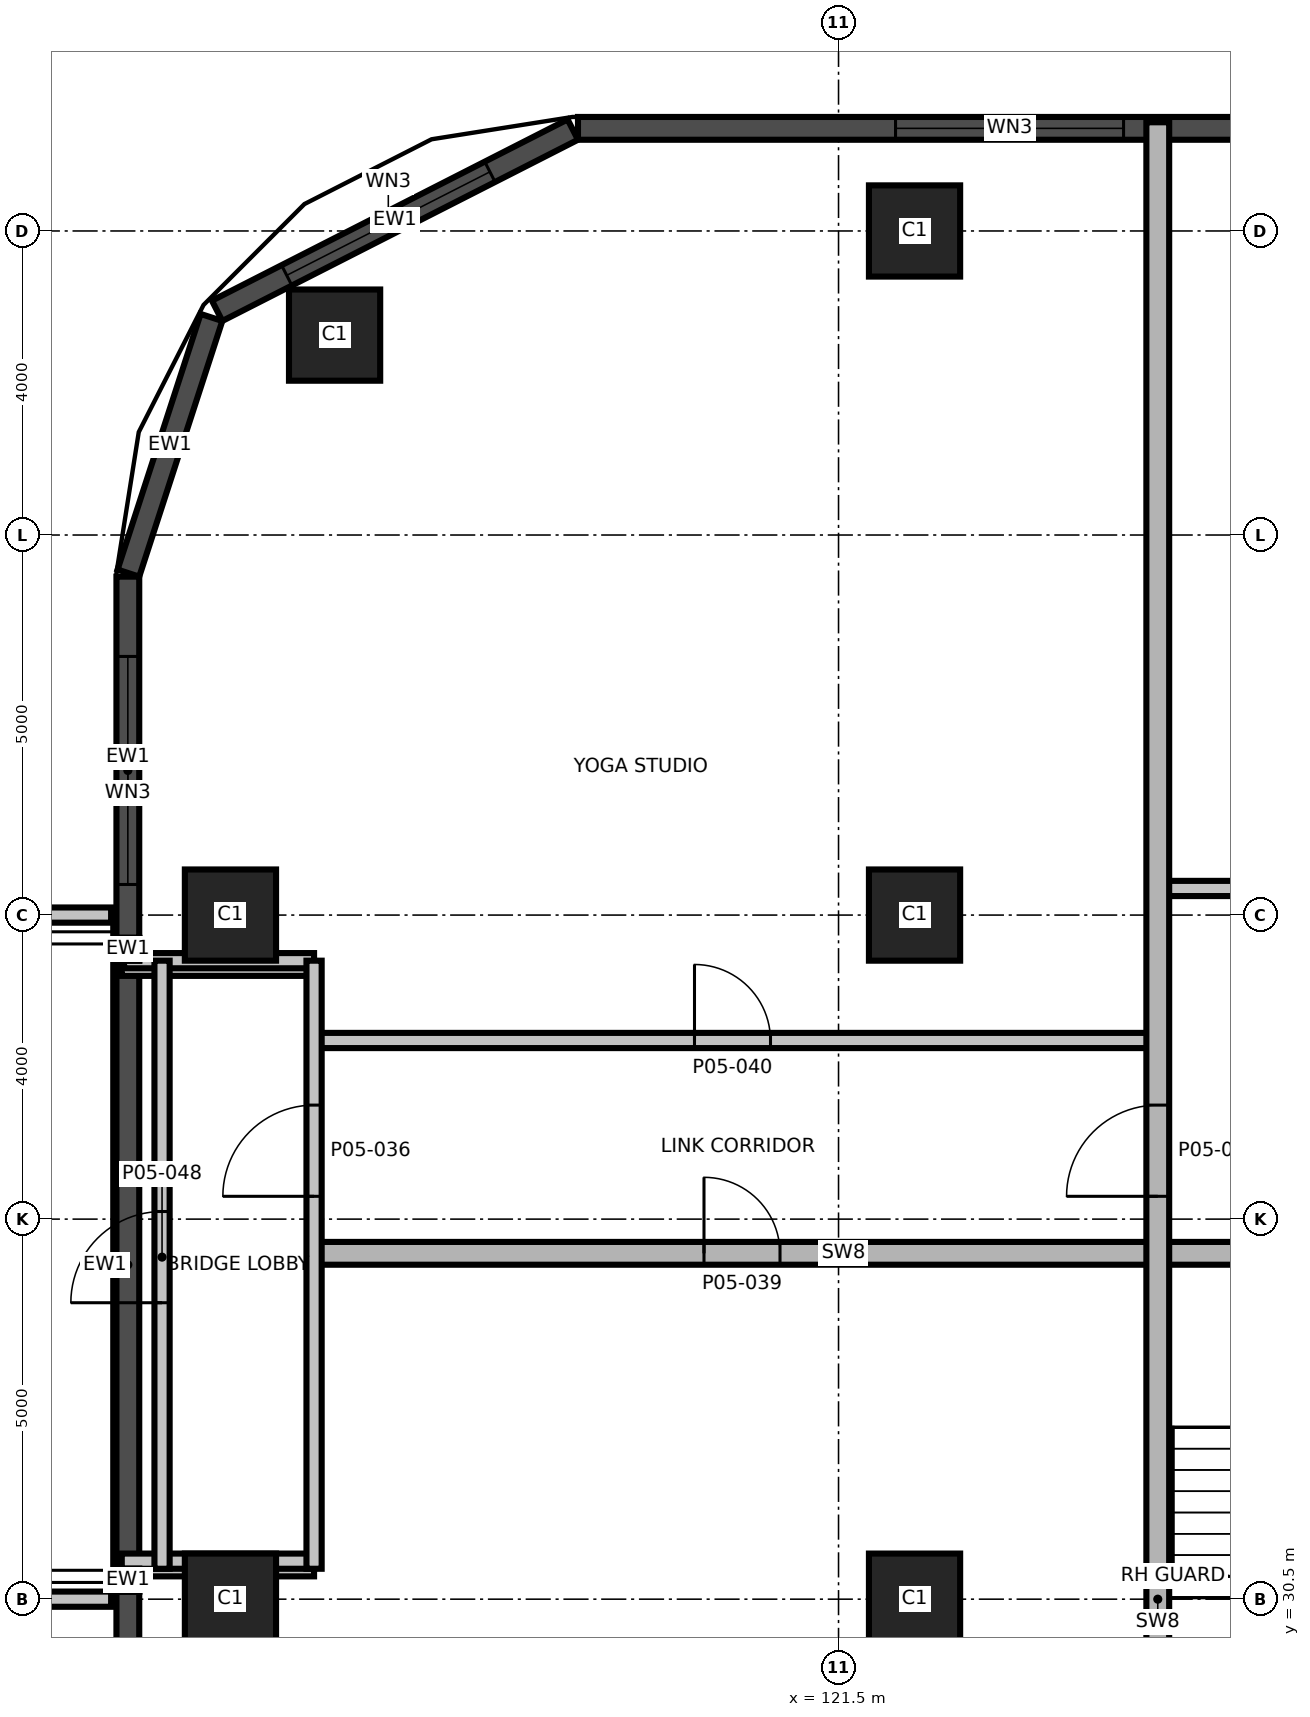
"""IFC4 building model, lengths in metres.
Left out: names, types, materials, properties, quantities, classifications, styles, units other than length and angle.
Written with IfcOpenShell. Run it as: python <this file> out.ifc"""

import sys

from ifc_helpers import new_model, si_unit, direction, frame, frame_2d, origin, origin_2d, place, context, subcontext, project, spatial, rectangle, extrude, element, fill, save


model = new_model("IFC4")
c1 = context("Model", 3, precision=1e-05, world=origin(), true_north=direction((0.0, 1.0)))
c2 = subcontext(c1, "Body", "Model", "MODEL_VIEW")
j1 = project(units=[si_unit("LENGTHUNIT", "METRE"), si_unit("PLANEANGLEUNIT", "RADIAN")], contexts=[c1])
p1 = place(None, origin())
s1 = spatial("IfcSite", under=j1, at=p1, CompositionType="ELEMENT")
p2 = place(p1, origin())
s2 = spatial("IfcBuilding", under=s1, at=p2, CompositionType="ELEMENT")
p3 = place(p2, frame((0.0, 0.0, 28.5)))
s3 = spatial("IfcBuildingStorey", under=s2, at=p3, CompositionType="ELEMENT", Elevation=28.5)
for number, where, z_axis, x_axis in (
    (1, (113.5, 30.5, 0.0), (0.0, 0.0, 1.0), (1.0, 0.0, 0.0)),
    (2, (122.5, 30.5, 0.0), (0.0, 0.0, 1.0), (1.0, 0.0, 0.0)),
    (3, (113.5, 39.5, 0.0), (0.0, 0.0, 1.0), (1.0, 0.0, 0.0)),
    (4, (122.5, 39.5, 0.0), (0.0, 0.0, 1.0), (1.0, 0.0, 0.0)),
    (5, (114.87, 47.13, 0.0), (0.0, 0.0, 1.0), (1.0, 0.0, 0.0)),
    (6, (122.5, 48.5, 0.0), (0.0, 0.0, 1.0), (1.0, 0.0, 0.0)),
):
    element("IfcColumn", number, at=place(p3, frame(where, z_axis=z_axis, x_axis=x_axis)), inside=s3, PredefinedType="COLUMN", context=c2, shape_type="SweptSolid", body=[
        extrude(rectangle(XDim=1.2, YDim=1.2, at=origin_2d()), origin(), (0.0, 0.0, 1.0), 5.0),
    ])
p4 = place(p3, frame((153.952, 49.85, 0.0), z_axis=(0.0, 0.0, 1.0), x_axis=(-1.0, 0.0, 0.0)))
e7 = element("IfcWall", 7, at=p4, inside=s3, PredefinedType="SOLIDWALL", context=c2, shape_type="SweptSolid", body=[
    extrude(rectangle(XDim=35.88, YDim=0.3, at=frame_2d((17.94, 0.0))), origin(), (0.0, 0.0, 1.0), 4.7),
])
p5 = place(p4, frame((1.226, 0.0, 0.9)))
e8 = element("IfcOpeningElement", 8, at=p5, cuts=e7, PredefinedType="OPENING", context=c2, shape_type="SweptSolid", body=[
    extrude(rectangle(XDim=3.0, YDim=2.4, at=frame_2d((1.5, 1.2))), frame((0.0, 0.16, 0.0), z_axis=(0.0, -1.0, 0.0), x_axis=(1.0, 0.0, 0.0)), (0.0, 0.0, 1.0), 0.32),
])
p6 = place(p4, frame((10.702, 0.0, 0.9)))
e9 = element("IfcOpeningElement", 9, at=p6, cuts=e7, PredefinedType="OPENING", context=c2, shape_type="SweptSolid", body=[
    extrude(rectangle(XDim=3.0, YDim=2.4, at=frame_2d((1.5, 1.2))), frame((0.0, 0.16, 0.0), z_axis=(0.0, -1.0, 0.0), x_axis=(1.0, 0.0, 0.0)), (0.0, 0.0, 1.0), 0.32),
])
p7 = place(p4, frame((19.702, 0.0, 0.9)))
e10 = element("IfcOpeningElement", 10, at=p7, cuts=e7, PredefinedType="OPENING", context=c2, shape_type="SweptSolid", body=[
    extrude(rectangle(XDim=3.0, YDim=2.4, at=frame_2d((1.5, 1.2))), frame((0.0, 0.16, 0.0), z_axis=(0.0, -1.0, 0.0), x_axis=(1.0, 0.0, 0.0)), (0.0, 0.0, 1.0), 0.32),
])
p8 = place(p4, frame((24.202, 0.0, 0.9)))
e11 = element("IfcOpeningElement", 11, at=p8, cuts=e7, PredefinedType="OPENING", context=c2, shape_type="SweptSolid", body=[
    extrude(rectangle(XDim=3.0, YDim=2.4, at=frame_2d((1.5, 1.2))), frame((0.0, 0.16, 0.0), z_axis=(0.0, -1.0, 0.0), x_axis=(1.0, 0.0, 0.0)), (0.0, 0.0, 1.0), 0.32),
])
p9 = place(p4, frame((28.702, 0.0, 0.9)))
e12 = element("IfcOpeningElement", 12, at=p9, cuts=e7, PredefinedType="OPENING", context=c2, shape_type="SweptSolid", body=[
    extrude(rectangle(XDim=3.0, YDim=2.4, at=frame_2d((1.5, 1.2))), frame((0.0, 0.16, 0.0), z_axis=(0.0, -1.0, 0.0), x_axis=(1.0, 0.0, 0.0)), (0.0, 0.0, 1.0), 0.32),
])
p10 = place(p3, frame((118.004, 49.834, 0.0), z_axis=(0.0, 0.0, 1.0), x_axis=(-0.890998339455, -0.454006562826, 0.0)))
e13 = element("IfcWall", 13, at=p10, inside=s3, PredefinedType="SOLIDWALL", context=c2, shape_type="SweptSolid", body=[
    extrude(rectangle(XDim=5.252, YDim=0.3, at=frame_2d((2.626, 0.0))), origin(), (0.0, 0.0, 1.0), 4.7),
])
p11 = place(p10, frame((1.224, 0.0, 0.9)))
e14 = element("IfcOpeningElement", 14, at=p11, cuts=e13, PredefinedType="OPENING", context=c2, shape_type="SweptSolid", body=[
    extrude(rectangle(XDim=3.0, YDim=2.4, at=frame_2d((1.5, 1.2))), frame((0.0, 0.16, 0.0), z_axis=(0.0, -1.0, 0.0), x_axis=(1.0, 0.0, 0.0)), (0.0, 0.0, 1.0), 0.32),
])
p12 = place(p3, frame((113.25, 47.362, 0.0), z_axis=(0.0, 0.0, 1.0), x_axis=(-0.309073584194, -0.951038127287, 0.0)))
e15 = element("IfcWall", 15, at=p12, inside=s3, PredefinedType="SOLIDWALL", context=c2, shape_type="SweptSolid", body=[
    extrude(rectangle(XDim=3.536, YDim=0.3, at=frame_2d((1.768, 0.0))), origin(), (0.0, 0.0, 1.0), 4.7),
])
p13 = place(p3, frame((112.15, 38.9, 3.15), z_axis=(0.0, 0.0, 1.0), x_axis=(0.0, -1.0, 0.0)))
e16 = element("IfcWall", 16, at=p13, inside=s3, PredefinedType="SOLIDWALL", context=c2, shape_type="SweptSolid", body=[
    extrude(rectangle(XDim=8.0, YDim=0.3, at=frame_2d((4.0, 0.0))), origin(), (0.0, 0.0, 1.0), 1.55),
])
p14 = place(p3, frame((112.15, 43.952, 0.0), z_axis=(0.0, 0.0, 1.0), x_axis=(0.0, -1.0, 0.0)))
e17 = element("IfcWall", 17, at=p14, inside=s3, PredefinedType="SOLIDWALL", context=c2, shape_type="SweptSolid", body=[
    extrude(rectangle(XDim=4.752, YDim=0.3, at=frame_2d((2.376, 0.0))), origin(), (0.0, 0.0, 1.0), 4.7),
])
p15 = place(p14, frame((1.05, 0.0, 0.9)))
e18 = element("IfcOpeningElement", 18, at=p15, cuts=e17, PredefinedType="OPENING", context=c2, shape_type="SweptSolid", body=[
    extrude(rectangle(XDim=3.0, YDim=2.4, at=frame_2d((1.5, 1.2))), frame((0.0, 0.16, 0.0), z_axis=(0.0, -1.0, 0.0), x_axis=(1.0, 0.0, 0.0)), (0.0, 0.0, 1.0), 0.32),
])
p16 = place(p3, frame((112.15, 30.6, 0.0), z_axis=(0.0, 0.0, 1.0), x_axis=(0.0, -1.0, 0.0)))
e19 = element("IfcWall", 19, at=p16, inside=s3, PredefinedType="SOLIDWALL", context=c2, shape_type="SweptSolid", body=[
    extrude(rectangle(XDim=13.528, YDim=0.3, at=frame_2d((6.764, 0.0))), origin(), (0.0, 0.0, 1.0), 4.7),
])
p17 = place(p16, frame((0.676, 0.0, 0.9)))
e20 = element("IfcOpeningElement", 20, at=p17, cuts=e19, PredefinedType="OPENING", context=c2, shape_type="SweptSolid", body=[
    extrude(rectangle(XDim=3.0, YDim=2.4, at=frame_2d((1.5, 1.2))), frame((0.0, 0.16, 0.0), z_axis=(0.0, -1.0, 0.0), x_axis=(1.0, 0.0, 0.0)), (0.0, 0.0, 1.0), 0.32),
])
p18 = place(p16, frame((5.376, 0.0, 0.9)))
e21 = element("IfcOpeningElement", 21, at=p18, cuts=e19, PredefinedType="OPENING", context=c2, shape_type="SweptSolid", body=[
    extrude(rectangle(XDim=3.0, YDim=2.4, at=frame_2d((1.5, 1.2))), frame((0.0, 0.16, 0.0), z_axis=(0.0, -1.0, 0.0), x_axis=(1.0, 0.0, 0.0)), (0.0, 0.0, 1.0), 0.32),
])
p19 = place(p16, frame((9.876, 0.0, 0.9)))
e22 = element("IfcOpeningElement", 22, at=p19, cuts=e19, PredefinedType="OPENING", context=c2, shape_type="SweptSolid", body=[
    extrude(rectangle(XDim=3.0, YDim=2.4, at=frame_2d((1.5, 1.2))), frame((0.0, 0.16, 0.0), z_axis=(0.0, -1.0, 0.0), x_axis=(1.0, 0.0, 0.0)), (0.0, 0.0, 1.0), 0.32),
])
p20 = place(p3, frame((105.07, 30.5, 0.0), z_axis=(0.0, 0.0, 1.0), x_axis=(1.0, 0.0, 0.0)))
e23 = element("IfcWall", 23, at=p20, inside=s3, PredefinedType="PARTITIONING", context=c2, shape_type="SweptSolid", body=[
    extrude(rectangle(XDim=6.86, YDim=0.2, at=frame_2d((3.43, 0.0))), origin(), (0.0, 0.0, 1.0), 4.7),
])
p21 = place(p3, frame((112.1, 30.9, 0.0), z_axis=(0.0, 0.0, 1.0), x_axis=(1.0, 0.0, 0.0)))
e24 = element("IfcWall", 24, at=p21, inside=s3, PredefinedType="PARTITIONING", context=c2, shape_type="SweptSolid", body=[
    extrude(rectangle(XDim=2.5, YDim=0.2, at=frame_2d((1.25, 0.0))), origin(), (0.0, 0.0, 1.0), 2.7),
])
p22 = place(p3, frame((112.07, 31.0, 0.0), z_axis=(0.0, 0.0, 1.0), x_axis=(1.0, 0.0, 0.0)))
e25 = element("IfcWall", 25, at=p22, inside=s3, PredefinedType="PARTITIONING", context=c2, shape_type="SweptSolid", body=[
    extrude(rectangle(XDim=2.53, YDim=0.2, at=frame_2d((1.265, 0.0))), origin(), (0.0, 0.0, 1.0), 4.7),
])
p23 = place(p3, frame((114.6, 35.05, 0.0), z_axis=(0.0, 0.0, 1.0), x_axis=(1.0, 0.0, 0.0)))
e26 = element("IfcWall", 26, at=p23, inside=s3, PredefinedType="SHEAR", context=c2, shape_type="SweptSolid", body=[
    extrude(rectangle(XDim=13.93, YDim=0.3, at=frame_2d((6.965, 0.0))), origin(), (0.0, 0.0, 1.0), 4.65),
])
p24 = place(p23, frame((5.13, 0.0, 0.0)))
e27 = element("IfcOpeningElement", 27, at=p24, cuts=e26, PredefinedType="OPENING", context=c2, shape_type="SweptSolid", body=[
    extrude(rectangle(XDim=1.0, YDim=2.1, at=frame_2d((0.5, 1.05))), frame((0.0, 0.16, 0.0), z_axis=(0.0, -1.0, 0.0), x_axis=(1.0, 0.0, 0.0)), (0.0, 0.0, 1.0), 0.32),
])
p25 = place(p3, frame((114.6, 37.85, 0.0), z_axis=(0.0, 0.0, 1.0), x_axis=(1.0, 0.0, 0.0)))
e28 = element("IfcWall", 28, at=p25, inside=s3, PredefinedType="PARTITIONING", context=c2, shape_type="SweptSolid", body=[
    extrude(rectangle(XDim=11.15, YDim=0.2, at=frame_2d((5.575, 0.0))), origin(), (0.0, 0.0, 1.0), 3.8),
])
p26 = place(p25, frame((5.005, 0.0, 0.0)))
e29 = element("IfcOpeningElement", 29, at=p26, cuts=e28, PredefinedType="OPENING", context=c2, shape_type="SweptSolid", body=[
    extrude(rectangle(XDim=1.0, YDim=2.1, at=frame_2d((0.5, 1.05))), frame((0.0, 0.11, 0.0), z_axis=(0.0, -1.0, 0.0), x_axis=(1.0, 0.0, 0.0)), (0.0, 0.0, 1.0), 0.22),
])
p27 = place(p3, frame((112.07, 38.8, 0.0), z_axis=(0.0, 0.0, 1.0), x_axis=(1.0, 0.0, 0.0)))
e30 = element("IfcWall", 30, at=p27, inside=s3, PredefinedType="PARTITIONING", context=c2, shape_type="SweptSolid", body=[
    extrude(rectangle(XDim=2.53, YDim=0.2, at=frame_2d((1.265, 0.0))), origin(), (0.0, 0.0, 1.0), 4.7),
])
p28 = place(p3, frame((112.1, 38.9, 0.0), z_axis=(0.0, 0.0, 1.0), x_axis=(1.0, 0.0, 0.0)))
e31 = element("IfcWall", 31, at=p28, inside=s3, PredefinedType="PARTITIONING", context=c2, shape_type="SweptSolid", body=[
    extrude(rectangle(XDim=2.5, YDim=0.2, at=frame_2d((1.25, 0.0))), origin(), (0.0, 0.0, 1.0), 2.7),
])
p29 = place(p3, frame((105.07, 39.5, 0.0), z_axis=(0.0, 0.0, 1.0), x_axis=(1.0, 0.0, 0.0)))
e32 = element("IfcWall", 32, at=p29, inside=s3, PredefinedType="PARTITIONING", context=c2, shape_type="SweptSolid", body=[
    extrude(rectangle(XDim=6.86, YDim=0.2, at=frame_2d((3.43, 0.0))), origin(), (0.0, 0.0, 1.0), 4.7),
])
p30 = place(p3, frame((125.75, 39.85, 0.0), z_axis=(0.0, 0.0, 1.0), x_axis=(1.0, 0.0, 0.0)))
e33 = element("IfcWall", 33, at=p30, inside=s3, PredefinedType="PARTITIONING", context=c2, shape_type="SweptSolid", body=[
    extrude(rectangle(XDim=3.25, YDim=0.2, at=frame_2d((1.625, 0.0))), origin(), (0.0, 0.0, 1.0), 3.8),
])
p31 = place(p3, frame((112.6, 30.9, 0.0), z_axis=(0.0, 0.0, 1.0), x_axis=(0.0, 1.0, 0.0)))
e34 = element("IfcWall", 34, at=p31, inside=s3, PredefinedType="PARTITIONING", context=c2, shape_type="SweptSolid", body=[
    extrude(rectangle(XDim=8.0, YDim=0.2, at=frame_2d((4.0, 0.0))), origin(), (0.0, 0.0, 1.0), 4.7),
])
p32 = place(p31, frame((3.5, 0.0, 0.0)))
e35 = element("IfcOpeningElement", 35, at=p32, cuts=e34, PredefinedType="OPENING", context=c2, shape_type="SweptSolid", body=[
    extrude(rectangle(XDim=1.2, YDim=2.1, at=frame_2d((0.6, 1.05))), frame((0.0, 0.11, 0.0), z_axis=(0.0, -1.0, 0.0), x_axis=(1.0, 0.0, 0.0)), (0.0, 0.0, 1.0), 0.22),
])
p33 = place(p3, frame((114.6, 30.9, 0.0), z_axis=(0.0, 0.0, 1.0), x_axis=(0.0, 1.0, 0.0)))
e36 = element("IfcWall", 36, at=p33, inside=s3, PredefinedType="PARTITIONING", context=c2, shape_type="SweptSolid", body=[
    extrude(rectangle(XDim=8.0, YDim=0.2, at=frame_2d((4.0, 0.0))), origin(), (0.0, 0.0, 1.0), 4.7),
])
p34 = place(p33, frame((4.9, 0.0, 0.0)))
e37 = element("IfcOpeningElement", 37, at=p34, cuts=e36, PredefinedType="OPENING", context=c2, shape_type="SweptSolid", body=[
    extrude(rectangle(XDim=1.2, YDim=2.1, at=frame_2d((0.6, 1.05))), frame((0.0, 0.11, 0.0), z_axis=(0.0, -1.0, 0.0), x_axis=(1.0, 0.0, 0.0)), (0.0, 0.0, 1.0), 0.22),
])
p35 = place(p3, frame((125.7, 11.07, 0.0), z_axis=(0.0, 0.0, 1.0), x_axis=(0.0, 1.0, 0.0)))
e38 = element("IfcWall", 38, at=p35, inside=s3, PredefinedType="SHEAR", context=c2, shape_type="SweptSolid", body=[
    extrude(rectangle(XDim=38.86, YDim=0.3, at=frame_2d((19.43, 0.0))), origin(), (0.0, 0.0, 1.0), 4.65),
])
p36 = place(p35, frame((24.73, 0.0, 0.0)))
e39 = element("IfcOpeningElement", 39, at=p36, cuts=e38, PredefinedType="OPENING", context=c2, shape_type="SweptSolid", body=[
    extrude(rectangle(XDim=1.2, YDim=2.1, at=frame_2d((0.6, 1.05))), frame((0.0, 0.16, 0.0), z_axis=(0.0, -1.0, 0.0), x_axis=(1.0, 0.0, 0.0)), (0.0, 0.0, 1.0), 0.32),
])
p37 = place(p3, frame((112.15, 39.2, 0.0), z_axis=(0.0, 0.0, 1.0), x_axis=(0.0, -1.0, 0.0)))
e40 = element("IfcWall", 40, at=p37, inside=s3, PredefinedType="SOLIDWALL", context=c2, shape_type="SweptSolid", body=[
    extrude(rectangle(XDim=0.3, YDim=0.3, at=frame_2d((0.15, 0.0))), origin(), (0.0, 0.0, 1.0), 2.7),
])
p38 = place(p3, frame((112.15, 39.2, 3.15), z_axis=(0.0, 0.0, 1.0), x_axis=(0.0, -1.0, 0.0)))
e41 = element("IfcWall", 41, at=p38, inside=s3, PredefinedType="SOLIDWALL", context=c2, shape_type="SweptSolid", body=[
    extrude(rectangle(XDim=0.3, YDim=0.3, at=frame_2d((0.15, 0.0))), origin(), (0.0, 0.0, 1.0), 1.55),
])
p39 = place(p3, frame((112.15, 30.6, 0.0), z_axis=(0.0, 0.0, 1.0), x_axis=(0.0, 1.0, 0.0)))
e42 = element("IfcWall", 42, at=p39, inside=s3, PredefinedType="SOLIDWALL", context=c2, shape_type="SweptSolid", body=[
    extrude(rectangle(XDim=0.3, YDim=0.3, at=frame_2d((0.15, 0.0))), origin(), (0.0, 0.0, 1.0), 2.7),
])
p40 = place(p3, frame((112.15, 30.6, 3.15), z_axis=(0.0, 0.0, 1.0), x_axis=(0.0, 1.0, 0.0)))
e43 = element("IfcWall", 43, at=p40, inside=s3, PredefinedType="SOLIDWALL", context=c2, shape_type="SweptSolid", body=[
    extrude(rectangle(XDim=0.3, YDim=0.3, at=frame_2d((0.15, 0.0))), origin(), (0.0, 0.0, 1.0), 1.55),
])
p41 = place(p9, origin())
e44 = element("IfcWindow", 44, at=p41, inside=s3, PartitioningType="SINGLE_PANEL", PredefinedType="WINDOW", context=c2, shape_type="SweptSolid", body=[
    extrude(rectangle(XDim=3.0, YDim=2.4, at=frame_2d((1.5, 1.2))), frame((0.0, 0.03, 0.0), z_axis=(0.0, -1.0, 0.0), x_axis=(1.0, 0.0, 0.0)), (0.0, 0.0, 1.0), 0.06),
])
fill(e12, e44)
p42 = place(p11, origin())
e45 = element("IfcWindow", 45, at=p42, inside=s3, PartitioningType="SINGLE_PANEL", PredefinedType="WINDOW", context=c2, shape_type="SweptSolid", body=[
    extrude(rectangle(XDim=3.0, YDim=2.4, at=frame_2d((1.5, 1.2))), frame((0.0, 0.03, 0.0), z_axis=(0.0, -1.0, 0.0), x_axis=(1.0, 0.0, 0.0)), (0.0, 0.0, 1.0), 0.06),
])
fill(e14, e45)
p43 = place(p15, origin())
e46 = element("IfcWindow", 46, at=p43, inside=s3, PartitioningType="SINGLE_PANEL", PredefinedType="WINDOW", context=c2, shape_type="SweptSolid", body=[
    extrude(rectangle(XDim=3.0, YDim=2.4, at=frame_2d((1.5, 1.2))), frame((0.0, 0.03, 0.0), z_axis=(0.0, -1.0, 0.0), x_axis=(1.0, 0.0, 0.0)), (0.0, 0.0, 1.0), 0.06),
])
fill(e18, e46)
p44 = place(p34, origin())
e47 = element("IfcDoor", 47, at=p44, inside=s3, OperationType="SINGLE_SWING_RIGHT", PredefinedType="DOOR", context=c2, shape_type="SweptSolid", body=[
    extrude(rectangle(XDim=1.2, YDim=2.1, at=frame_2d((0.6, 1.05))), frame((0.0, 0.025, 0.0), z_axis=(0.0, -1.0, 0.0), x_axis=(1.0, 0.0, 0.0)), (0.0, 0.0, 1.0), 0.05),
])
fill(e37, e47)
p45 = place(p36, origin())
e48 = element("IfcDoor", 48, at=p45, inside=s3, OperationType="SINGLE_SWING_LEFT", PredefinedType="DOOR", context=c2, shape_type="SweptSolid", body=[
    extrude(rectangle(XDim=1.2, YDim=2.1, at=frame_2d((0.6, 1.05))), frame((0.0, 0.025, 0.0), z_axis=(0.0, -1.0, 0.0), x_axis=(1.0, 0.0, 0.0)), (0.0, 0.0, 1.0), 0.05),
])
fill(e39, e48)
p46 = place(p24, origin())
e49 = element("IfcDoor", 49, at=p46, inside=s3, OperationType="SINGLE_SWING_LEFT", PredefinedType="DOOR", context=c2, shape_type="SweptSolid", body=[
    extrude(rectangle(XDim=1.0, YDim=2.1, at=frame_2d((0.5, 1.05))), frame((0.0, 0.025, 0.0), z_axis=(0.0, -1.0, 0.0), x_axis=(1.0, 0.0, 0.0)), (0.0, 0.0, 1.0), 0.05),
])
fill(e27, e49)
p47 = place(p26, origin())
e50 = element("IfcDoor", 50, at=p47, inside=s3, OperationType="SINGLE_SWING_RIGHT", PredefinedType="DOOR", context=c2, shape_type="SweptSolid", body=[
    extrude(rectangle(XDim=1.0, YDim=2.1, at=frame_2d((0.5, 1.05))), frame((0.0, 0.025, 0.0), z_axis=(0.0, -1.0, 0.0), x_axis=(1.0, 0.0, 0.0)), (0.0, 0.0, 1.0), 0.05),
])
fill(e29, e50)
p48 = place(p32, origin())
e51 = element("IfcDoor", 51, at=p48, inside=s3, OperationType="SINGLE_SWING_RIGHT", PredefinedType="DOOR", context=c2, shape_type="SweptSolid", body=[
    extrude(rectangle(XDim=1.2, YDim=2.1, at=frame_2d((0.6, 1.05))), frame((0.0, 0.025, 0.0), z_axis=(0.0, -1.0, 0.0), x_axis=(1.0, 0.0, 0.0)), (0.0, 0.0, 1.0), 0.05),
])
fill(e35, e51)
save(model, sys.argv[1])
